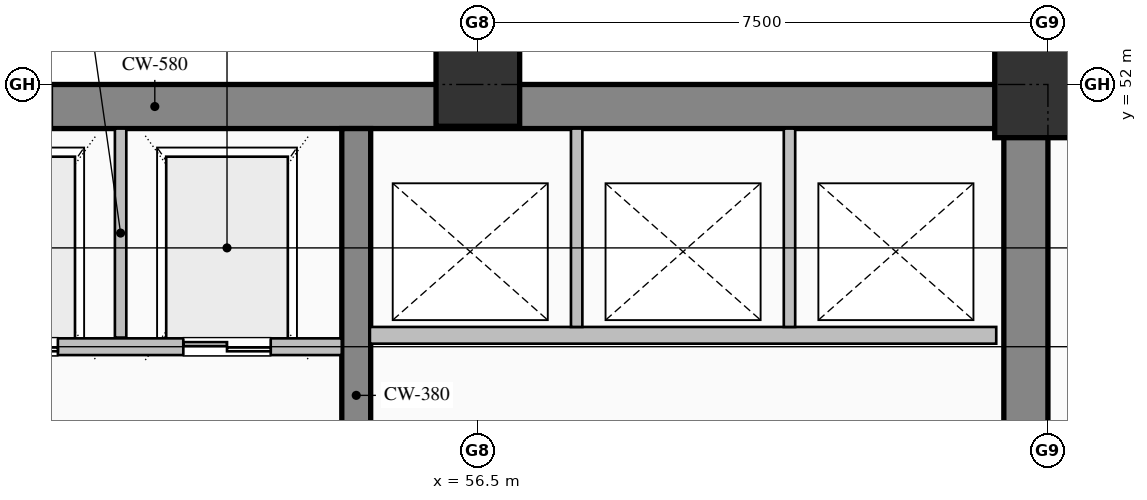
"""IFC4 building model, lengths in metres.
Left out: names, types, materials, properties, quantities, classifications, styles, units other than length and angle.
Written with IfcOpenShell. Run it as: python <this file> out.ifc"""

import sys

from ifc_helpers import new_model, si_unit, direction, frame, frame_2d, origin, origin_2d, place, context, subcontext, project, spatial, rectangle, hollow_rectangle, extrude, element, fill, save


model = new_model("IFC4")
c1 = context("Model", 3, precision=1e-05, world=origin(), true_north=direction((0.0, 1.0)))
c2 = subcontext(c1, "Body", "Model", "MODEL_VIEW")
j1 = project(units=[si_unit("LENGTHUNIT", "METRE"), si_unit("PLANEANGLEUNIT", "RADIAN")], contexts=[c1])
p1 = place(None, origin())
s1 = spatial("IfcSite", under=j1, at=p1, CompositionType="ELEMENT")
p2 = place(p1, origin())
s2 = spatial("IfcBuilding", under=s1, at=p2, CompositionType="ELEMENT")
p3 = place(p2, frame((0.0, 0.0, 6.0)))
s3 = spatial("IfcBuildingStorey", under=s2, at=p3, CompositionType="ELEMENT", Elevation=6.0)
p4 = place(p3, frame((40.5, 51.71, 0.0), z_axis=(0.0, 0.0, 1.0), x_axis=(1.0, 0.0, 0.0)))
e1 = element("IfcWall", 1, at=p4, inside=s3, PredefinedType="SHEAR", context=c2, shape_type="SweptSolid", body=[
    extrude(rectangle(XDim=23.5, YDim=0.58, at=frame_2d((11.75, 0.0))), origin(), (0.0, 0.0, 1.0), 5.12),
])
p5 = place(p3, frame((63.71, 36.32, 0.0), z_axis=(0.0, 0.0, 1.0), x_axis=(0.0, 1.0, 0.0)))
e2 = element("IfcWall", 2, at=p5, inside=s3, PredefinedType="SHEAR", context=c2, shape_type="SweptSolid", body=[
    extrude(rectangle(XDim=15.1, YDim=0.58, at=frame_2d((7.55, 0.0))), origin(), (0.0, 0.0, 1.0), 5.12),
])
p6 = place(p3, frame((54.9, 44.4, 0.0), z_axis=(0.0, 0.0, 1.0), x_axis=(0.0, 1.0, 0.0)))
e3 = element("IfcWall", 3, at=p6, inside=s3, PredefinedType="SHEAR", context=c2, shape_type="SweptSolid", body=[
    extrude(rectangle(XDim=7.02, YDim=0.38, at=frame_2d((3.51, 0.0))), origin(), (0.0, 0.0, 1.0), 5.12),
])
p7 = place(p3, frame((56.5, 52.0, 0.0), z_axis=(0.0, 0.0, 1.0), x_axis=(1.0, 0.0, 0.0)))
e4 = element("IfcColumn", 4, at=p7, inside=s3, PredefinedType="COLUMN", context=c2, shape_type="SweptSolid", body=[
    extrude(hollow_rectangle(XDim=1.1, YDim=1.1, WallThickness=0.04, at=origin_2d()), origin(), (0.0, 0.0, 1.0), 5.4),
])
p8 = place(p3, frame((64.0, 52.0, 0.0), z_axis=(0.0, 0.0, 1.0), x_axis=(1.0, 0.0, 0.0)))
e5 = element("IfcColumn", 5, at=p8, inside=s3, PredefinedType="COLUMN", context=c2, shape_type="SweptSolid", body=[
    extrude(hollow_rectangle(XDim=1.4, YDim=1.4, WallThickness=0.05, at=origin_2d()), origin(), (0.0, 0.0, 1.0), 5.4),
])
p9 = place(p3, frame((63.98, 51.81, 0.0), z_axis=(0.0, 0.0, 1.0), x_axis=(1.0, 0.0, 0.0)))
e6 = element("IfcWall", 6, at=p9, inside=s3, PredefinedType="SOLIDWALL", context=c2, shape_type="SweptSolid", body=[
    extrude(rectangle(XDim=4.02, YDim=0.38, at=frame_2d((2.01, 0.0))), origin(), (0.0, 0.0, 1.0), 5.12),
])
p10 = place(p3, frame((54.71, 48.55, 0.0), z_axis=(0.0, 0.0, 1.0), x_axis=(-1.0, 0.0, 0.0)))
e7 = element("IfcWall", 7, at=p10, inside=s3, PredefinedType="PARTITIONING", context=c2, shape_type="SweptSolid", body=[
    extrude(rectangle(XDim=5.12, YDim=0.22, at=frame_2d((2.56, 0.0))), origin(), (0.0, 0.0, 1.0), 5.12),
])
p11 = place(p10, frame((3.735, 0.0, 0.0)))
e8 = element("IfcOpeningElement", 8, at=p11, cuts=e7, PredefinedType="OPENING", context=c2, shape_type="SweptSolid", body=[
    extrude(rectangle(XDim=1.15, YDim=2.2, at=frame_2d((0.575, 1.1))), frame((0.0, 0.12, 0.0), z_axis=(0.0, -1.0, 0.0), x_axis=(1.0, 0.0, 0.0)), (0.0, 0.0, 1.0), 0.24),
])
p12 = place(p10, frame((0.935, 0.0, 0.0)))
e9 = element("IfcOpeningElement", 9, at=p12, cuts=e7, PredefinedType="OPENING", context=c2, shape_type="SweptSolid", body=[
    extrude(rectangle(XDim=1.15, YDim=2.2, at=frame_2d((0.575, 1.1))), frame((0.0, 0.12, 0.0), z_axis=(0.0, -1.0, 0.0), x_axis=(1.0, 0.0, 0.0)), (0.0, 0.0, 1.0), 0.24),
])
p13 = place(p3, frame((51.8, 48.67, 0.0), z_axis=(0.0, 0.0, 1.0), x_axis=(0.0, 1.0, 0.0)))
e10 = element("IfcWall", 10, at=p13, inside=s3, PredefinedType="PARTITIONING", context=c2, shape_type="SweptSolid", body=[
    extrude(rectangle(XDim=2.75, YDim=0.15, at=frame_2d((1.375, 0.0))), origin(), (0.0, 0.0, 1.0), 5.12),
])
p14 = place(p3, frame((63.32, 48.7, 0.0), z_axis=(0.0, 0.0, 1.0), x_axis=(-1.0, 0.0, 0.0)))
e11 = element("IfcWall", 11, at=p14, inside=s3, PredefinedType="PARTITIONING", context=c2, shape_type="SweptSolid", body=[
    extrude(rectangle(XDim=8.24, YDim=0.22, at=frame_2d((4.12, 0.0))), origin(), (0.0, 0.0, 1.0), 5.12),
])
for number, where, z_axis, x_axis in (
    (12, (57.8, 48.81, 0.0), (0.0, 0.0, 1.0), (0.0, 1.0, 0.0)),
    (13, (60.6, 48.81, 0.0), (0.0, 0.0, 1.0), (0.0, 1.0, 0.0)),
):
    element("IfcWall", number, at=place(p3, frame(where, z_axis=z_axis, x_axis=x_axis)), inside=s3, PredefinedType="PARTITIONING", context=c2, shape_type="SweptSolid", body=[
        extrude(rectangle(XDim=2.61, YDim=0.15, at=frame_2d((1.305, 0.0))), origin(), (0.0, 0.0, 1.0), 5.12),
    ])
p15 = place(p11, origin())
e14 = element("IfcDoor", 14, at=p15, inside=s3, OperationType="DOUBLE_DOOR_SLIDING", PredefinedType="DOOR", context=c2, shape_type="SweptSolid", body=[
    extrude(rectangle(XDim=1.15, YDim=2.2, at=frame_2d((0.575, 1.1))), frame((0.0, 0.025, 0.0), z_axis=(0.0, -1.0, 0.0), x_axis=(1.0, 0.0, 0.0)), (0.0, 0.0, 1.0), 0.05),
])
fill(e8, e14)
p16 = place(p12, origin())
e15 = element("IfcDoor", 15, at=p16, inside=s3, OperationType="DOUBLE_DOOR_SLIDING", PredefinedType="DOOR", context=c2, shape_type="SweptSolid", body=[
    extrude(rectangle(XDim=1.15, YDim=2.2, at=frame_2d((0.575, 1.1))), frame((0.0, 0.025, 0.0), z_axis=(0.0, -1.0, 0.0), x_axis=(1.0, 0.0, 0.0)), (0.0, 0.0, 1.0), 0.05),
])
fill(e9, e15)
save(model, sys.argv[1])
